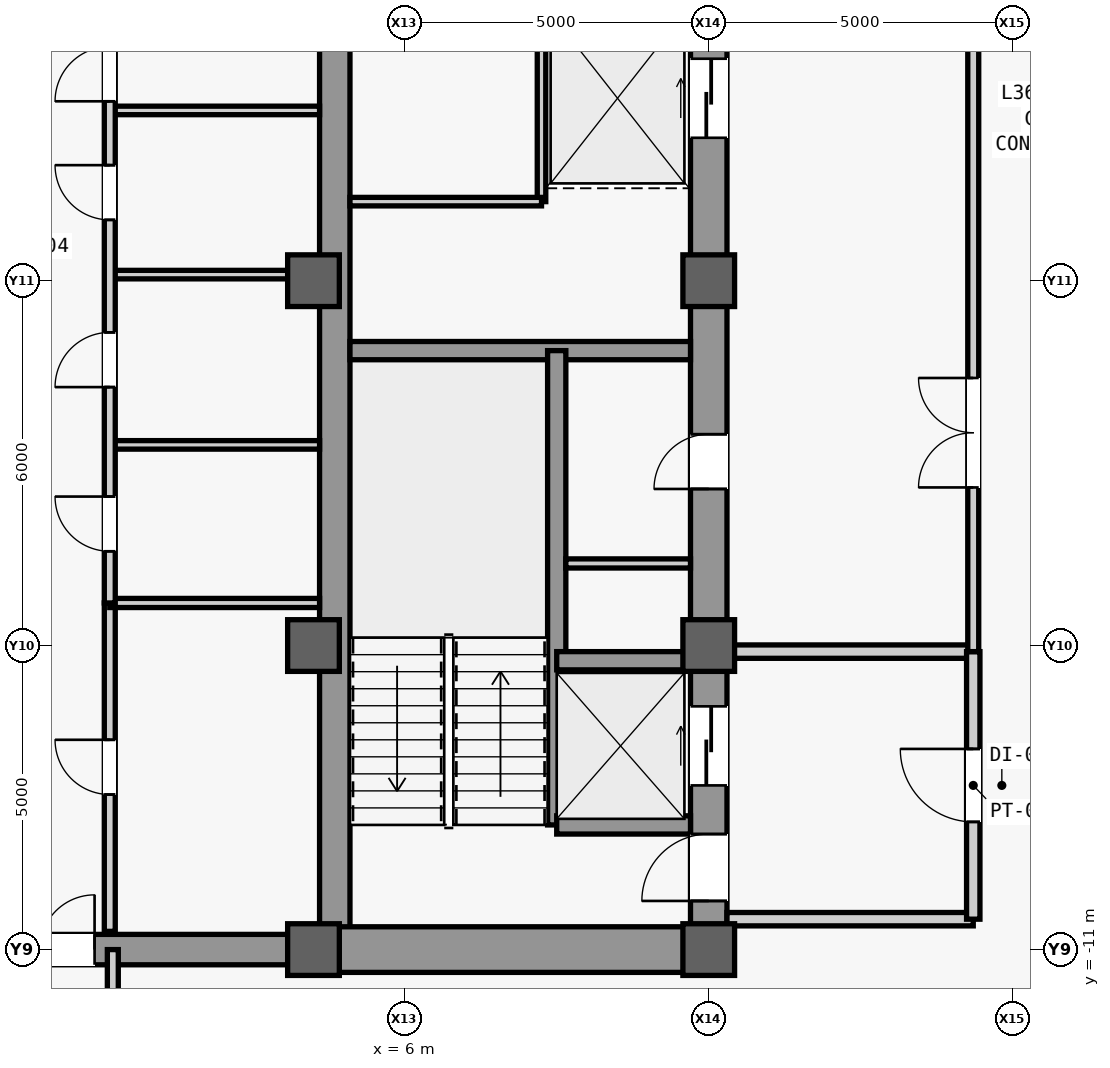
"""IFC4 building model, lengths in metres.
Left out: names, types, materials, properties, quantities, classifications, styles, units other than length and angle.
Written with IfcOpenShell. Run it as: python <this file> out.ifc"""

import sys

from ifc_helpers import new_model, si_unit, direction, frame, frame_2d, origin, origin_2d, place, context, subcontext, project, spatial, rectangle, extrude, source, transform, mapped, element, fill, save


model = new_model("IFC4")
c1 = context("Model", 3, precision=1e-05, world=origin(), true_north=direction((0.0, 1.0)))
c2 = subcontext(c1, "Body", "Model", "MODEL_VIEW")
j1 = project(units=[si_unit("LENGTHUNIT", "METRE"), si_unit("PLANEANGLEUNIT", "RADIAN")], contexts=[c1])
p1 = place(None, origin())
s1 = spatial("IfcSite", under=j1, at=p1, CompositionType="ELEMENT")
p2 = place(p1, origin())
s2 = spatial("IfcBuilding", under=s1, at=p2, CompositionType="ELEMENT")
p3 = place(p2, frame((0.0, 0.0, 159.1)))
s3 = spatial("IfcBuildingStorey", under=s2, at=p3, CompositionType="ELEMENT", Elevation=159.1)
m1 = source(origin(), c2, "Body", "SweptSolid", [
    extrude(rectangle(XDim=22.0, YDim=0.6, at=frame_2d((11.0, 0.0))), origin(), (0.0, 0.0, 1.0), 3.78),
])
p4 = place(p3, frame((11.0, -11.0, 0.0), z_axis=(0.0, 0.0, 1.0), x_axis=(0.0, 1.0, 0.0)))
e1 = element("IfcWall", 1, at=p4, inside=s3, PredefinedType="SHEAR", context=c2, shape_type="MappedRepresentation", body=[
    mapped(m1, transform((0.0, 0.0, 0.0), scale=1.0)),
])
m2 = source(origin(), c2, "Body", "SweptSolid", [
    extrude(rectangle(XDim=1.1, YDim=2.2, at=frame_2d((0.55, 1.1))), frame((0.0, 0.31, 0.0), z_axis=(0.0, -1.0, 0.0), x_axis=(1.0, 0.0, 0.0)), (0.0, 0.0, 1.0), 0.62),
])
p5 = place(p4, frame((0.8, 0.0, 0.0)))
e2 = element("IfcOpeningElement", 2, at=p5, cuts=e1, PredefinedType="OPENING", context=c2, shape_type="MappedRepresentation", body=[
    mapped(m2, transform((0.0, 0.0, 0.0), scale=1.0)),
])
m3 = source(origin(), c2, "Body", "SweptSolid", [
    extrude(rectangle(XDim=0.9, YDim=2.15, at=frame_2d((0.45, 1.075))), frame((0.0, 0.31, 0.0), z_axis=(0.0, -1.0, 0.0), x_axis=(1.0, 0.0, 0.0)), (0.0, 0.0, 1.0), 0.62),
])
p6 = place(p4, frame((7.575, 0.0, 0.0)))
e3 = element("IfcOpeningElement", 3, at=p6, cuts=e1, PredefinedType="OPENING", context=c2, shape_type="MappedRepresentation", body=[
    mapped(m3, transform((0.0, 0.0, 0.0), scale=1.0)),
])
m4 = source(origin(), c2, "Body", "SweptSolid", [
    extrude(rectangle(XDim=1.3, YDim=2.3, at=frame_2d((0.65, 1.15))), frame((0.0, 0.31, 0.0), z_axis=(0.0, -1.0, 0.0), x_axis=(1.0, 0.0, 0.0)), (0.0, 0.0, 1.0), 0.62),
])
p7 = place(p4, frame((2.7, 0.0, 0.0)))
e4 = element("IfcOpeningElement", 4, at=p7, cuts=e1, PredefinedType="OPENING", context=c2, shape_type="MappedRepresentation", body=[
    mapped(m4, transform((0.0, 0.0, 0.0), scale=1.0)),
])
p8 = place(p4, frame((13.35, 0.0, 0.0)))
e5 = element("IfcOpeningElement", 5, at=p8, cuts=e1, PredefinedType="OPENING", context=c2, shape_type="MappedRepresentation", body=[
    mapped(m4, transform((0.0, 0.0, 0.0), scale=1.0)),
])
m5 = source(origin(), c2, "Body", "SweptSolid", [
    extrude(rectangle(XDim=21.4, YDim=0.5, at=frame_2d((10.7, 0.0))), origin(), (0.0, 0.0, 1.0), 3.78),
])
p9 = place(p3, frame((4.85, -10.7, 0.0), z_axis=(0.0, 0.0, 1.0), x_axis=(0.0, 1.0, 0.0)))
e6 = element("IfcWall", 6, at=p9, inside=s3, PredefinedType="SHEAR", context=c2, shape_type="MappedRepresentation", body=[
    mapped(m5, transform((0.0, 0.0, 0.0), scale=1.0)),
])
m6 = source(origin(), c2, "Body", "SweptSolid", [
    extrude(rectangle(XDim=5.85, YDim=0.75, at=frame_2d((2.925, 0.0))), origin(), (0.0, 0.0, 1.0), 3.78),
])
p10 = place(p3, frame((4.85, -11.0, 0.0), z_axis=(0.0, 0.0, 1.0), x_axis=(1.0, 0.0, 0.0)))
e7 = element("IfcWall", 7, at=p10, inside=s3, PredefinedType="SHEAR", context=c2, shape_type="MappedRepresentation", body=[
    mapped(m6, transform((0.0, 0.0, 0.0), scale=1.0)),
])
m7 = source(origin(), c2, "Body", "SweptSolid", [
    extrude(rectangle(XDim=5.6, YDim=0.3, at=frame_2d((2.8, 0.0))), origin(), (0.0, 0.0, 1.0), 3.78),
])
p11 = place(p3, frame((5.1, -1.15, 0.0), z_axis=(0.0, 0.0, 1.0), x_axis=(1.0, 0.0, 0.0)))
e8 = element("IfcWall", 8, at=p11, inside=s3, PredefinedType="SHEAR", context=c2, shape_type="MappedRepresentation", body=[
    mapped(m7, transform((0.0, 0.0, 0.0), scale=1.0)),
])
m8 = source(origin(), c2, "Body", "SweptSolid", [
    extrude(rectangle(XDim=9.2, YDim=0.5, at=frame_2d((4.6, 0.0))), origin(), (0.0, 0.0, 1.0), 3.78),
])
p12 = place(p3, frame((-4.6, -11.0, 0.0), z_axis=(0.0, 0.0, 1.0), x_axis=(1.0, 0.0, 0.0)))
e9 = element("IfcWall", 9, at=p12, inside=s3, PredefinedType="SHEAR", context=c2, shape_type="MappedRepresentation", body=[
    mapped(m8, transform((0.0, 0.0, 0.0), scale=1.0)),
])
m9 = source(origin(), c2, "Body", "SweptSolid", [
    extrude(rectangle(XDim=1.8, YDim=2.25, at=frame_2d((0.9, 1.125))), frame((0.0, 0.26, 0.0), z_axis=(0.0, -1.0, 0.0), x_axis=(1.0, 0.0, 0.0)), (0.0, 0.0, 1.0), 0.52),
])
p13 = place(p12, frame((3.7, 0.0, 0.0)))
e10 = element("IfcOpeningElement", 10, at=p13, cuts=e9, PredefinedType="OPENING", context=c2, shape_type="MappedRepresentation", body=[
    mapped(m9, transform((0.0, 0.0, 0.0), scale=1.0)),
])
m10 = source(origin(), c2, "Body", "SweptSolid", [
    extrude(rectangle(XDim=0.85, YDim=0.85, at=origin_2d()), origin(), (0.0, 0.0, 1.0), 4.0),
])
for number, where, z_axis, x_axis in (
    (11, (4.5, -11.0, 0.0), (0.0, 0.0, 1.0), (1.0, 0.0, 0.0)),
    (12, (4.5, -6.0, 0.0), (0.0, 0.0, 1.0), (1.0, 0.0, 0.0)),
    (13, (4.5, 0.0, 0.0), (0.0, 0.0, 1.0), (1.0, 0.0, 0.0)),
    (14, (11.0, -11.0, 0.0), (0.0, 0.0, 1.0), (1.0, 0.0, 0.0)),
    (15, (11.0, -6.0, 0.0), (0.0, 0.0, 1.0), (1.0, 0.0, 0.0)),
    (16, (11.0, 0.0, 0.0), (0.0, 0.0, 1.0), (1.0, 0.0, 0.0)),
):
    element("IfcColumn", number, at=place(p3, frame(where, z_axis=z_axis, x_axis=x_axis)), inside=s3, PredefinedType="COLUMN", context=c2, shape_type="MappedRepresentation", body=[
        mapped(m10, transform((0.0, 0.0, 0.0), scale=1.0)),
    ])
m11 = source(origin(), c2, "Body", "SweptSolid", [
    extrude(rectangle(XDim=7.8, YDim=0.3, at=frame_2d((3.9, 0.0))), origin(), (0.0, 0.0, 1.0), 3.78),
])
p14 = place(p3, frame((8.5, -8.95, 0.0), z_axis=(0.0, 0.0, 1.0), x_axis=(0.0, 1.0, 0.0)))
e17 = element("IfcWall", 17, at=p14, inside=s3, PredefinedType="SHEAR", context=c2, shape_type="MappedRepresentation", body=[
    mapped(m11, transform((0.0, 0.0, 0.0), scale=1.0)),
])
m12 = source(origin(), c2, "Body", "SweptSolid", [
    extrude(rectangle(XDim=2.2, YDim=0.3, at=frame_2d((1.1, 0.0))), origin(), (0.0, 0.0, 1.0), 3.78),
])
for number, where, z_axis, x_axis in (
    (18, (8.5, -8.95, 0.0), (0.0, 0.0, 1.0), (1.0, 0.0, 0.0)),
    (19, (8.5, -6.25, 0.0), (0.0, 0.0, 1.0), (1.0, 0.0, 0.0)),
):
    element("IfcWall", number, at=place(p3, frame(where, z_axis=z_axis, x_axis=x_axis)), inside=s3, PredefinedType="SHEAR", context=c2, shape_type="MappedRepresentation", body=[
        mapped(m12, transform((0.0, 0.0, 0.0), scale=1.0)),
    ])
m13 = source(origin(), c2, "Body", "SweptSolid", [
    extrude(rectangle(XDim=2.05, YDim=0.15, at=frame_2d((1.025, 0.0))), origin(), (0.0, 0.0, 1.0), 3.78),
])
p15 = place(p3, frame((8.65, -4.65, 0.0), z_axis=(0.0, 0.0, 1.0), x_axis=(1.0, 0.0, 0.0)))
e20 = element("IfcWall", 20, at=p15, inside=s3, PredefinedType="PARTITIONING", context=c2, shape_type="MappedRepresentation", body=[
    mapped(m13, transform((0.0, 0.0, 0.0), scale=1.0)),
])
m14 = source(origin(), c2, "Body", "SweptSolid", [
    extrude(rectangle(XDim=9.4, YDim=0.14, at=frame_2d((4.7, 0.0))), origin(), (0.0, 0.0, 1.0), 3.78),
])
p16 = place(p3, frame((8.25, 1.3, 0.0), z_axis=(0.0, 0.0, 1.0), x_axis=(0.0, 1.0, 0.0)))
e21 = element("IfcWall", 21, at=p16, inside=s3, PredefinedType="PARTITIONING", context=c2, shape_type="MappedRepresentation", body=[
    mapped(m14, transform((0.0, 0.0, 0.0), scale=1.0)),
])
m15 = source(origin(), c2, "Body", "SweptSolid", [
    extrude(rectangle(XDim=3.15, YDim=0.14, at=frame_2d((1.575, 0.0))), origin(), (0.0, 0.0, 1.0), 3.78),
])
p17 = place(p3, frame((5.1, 1.3, 0.0), z_axis=(0.0, 0.0, 1.0), x_axis=(1.0, 0.0, 0.0)))
e22 = element("IfcWall", 22, at=p17, inside=s3, PredefinedType="PARTITIONING", context=c2, shape_type="MappedRepresentation", body=[
    mapped(m15, transform((0.0, 0.0, 0.0), scale=1.0)),
])
m16 = source(origin(), c2, "Body", "SweptSolid", [
    extrude(rectangle(XDim=4.05, YDim=0.22, at=frame_2d((2.025, 0.0))), origin(), (0.0, 0.0, 1.0), 3.78),
])
p18 = place(p3, frame((11.3, -10.5, 0.0), z_axis=(0.0, 0.0, 1.0), x_axis=(1.0, 0.0, 0.0)))
e23 = element("IfcWall", 23, at=p18, inside=s3, PredefinedType="PARTITIONING", context=c2, shape_type="MappedRepresentation", body=[
    mapped(m16, transform((0.0, 0.0, 0.0), scale=1.0)),
])
m17 = source(origin(), c2, "Body", "SweptSolid", [
    extrude(rectangle(XDim=4.05, YDim=0.22, at=frame_2d((2.025, 0.0))), origin(), (0.0, 0.0, 1.0), 3.007),
])
p19 = place(p3, frame((11.3, -6.1, 0.0), z_axis=(0.0, 0.0, 1.0), x_axis=(1.0, 0.0, 0.0)))
e24 = element("IfcWall", 24, at=p19, inside=s3, PredefinedType="PARTITIONING", context=c2, shape_type="MappedRepresentation", body=[
    mapped(m17, transform((0.0, 0.0, 0.0), scale=1.0)),
])
m18 = source(origin(), c2, "Body", "SweptSolid", [
    extrude(rectangle(XDim=4.4, YDim=0.22, at=frame_2d((2.2, 0.0))), origin(), (0.0, 0.0, 1.0), 3.78),
])
p20 = place(p3, frame((15.35, -10.5, 0.0), z_axis=(0.0, 0.0, 1.0), x_axis=(0.0, 1.0, 0.0)))
e25 = element("IfcWall", 25, at=p20, inside=s3, PredefinedType="PARTITIONING", context=c2, shape_type="MappedRepresentation", body=[
    mapped(m18, transform((0.0, 0.0, 0.0), scale=1.0)),
])
m19 = source(origin(), c2, "Body", "SweptSolid", [
    extrude(rectangle(XDim=1.2, YDim=2.2, at=frame_2d((0.6, 1.1))), frame((0.0, 0.12, 0.0), z_axis=(0.0, -1.0, 0.0), x_axis=(1.0, 0.0, 0.0)), (0.0, 0.0, 1.0), 0.24),
])
p21 = place(p20, frame((1.6, 0.0, 0.0)))
e26 = element("IfcOpeningElement", 26, at=p21, cuts=e25, PredefinedType="OPENING", context=c2, shape_type="MappedRepresentation", body=[
    mapped(m19, transform((0.0, 0.0, 0.0), scale=1.0)),
])
m20 = source(origin(), c2, "Body", "SweptSolid", [
    extrude(rectangle(XDim=16.6, YDim=0.18, at=frame_2d((8.3, 0.0))), origin(), (0.0, 0.0, 1.0), 3.78),
])
p22 = place(p3, frame((15.35, -6.1, 0.0), z_axis=(0.0, 0.0, 1.0), x_axis=(0.0, 1.0, 0.0)))
e27 = element("IfcWall", 27, at=p22, inside=s3, PredefinedType="PARTITIONING", context=c2, shape_type="MappedRepresentation", body=[
    mapped(m20, transform((0.0, 0.0, 0.0), scale=1.0)),
])
m21 = source(origin(), c2, "Body", "SweptSolid", [
    extrude(rectangle(XDim=1.8, YDim=2.25, at=frame_2d((0.9, 1.125))), frame((0.0, 0.1, 0.0), z_axis=(0.0, -1.0, 0.0), x_axis=(1.0, 0.0, 0.0)), (0.0, 0.0, 1.0), 0.2),
])
p23 = place(p22, frame((2.7, 0.0, 0.0)))
e28 = element("IfcOpeningElement", 28, at=p23, cuts=e27, PredefinedType="OPENING", context=c2, shape_type="MappedRepresentation", body=[
    mapped(m21, transform((0.0, 0.0, 0.0), scale=1.0)),
])
p24 = place(p22, frame((13.0, 0.0, 0.0)))
e29 = element("IfcOpeningElement", 29, at=p24, cuts=e27, PredefinedType="OPENING", context=c2, shape_type="MappedRepresentation", body=[
    mapped(m21, transform((0.0, 0.0, 0.0), scale=1.0)),
])
m22 = source(origin(), c2, "Body", "SweptSolid", [
    extrude(rectangle(XDim=5.4, YDim=0.18, at=frame_2d((2.7, 0.0))), origin(), (0.0, 0.0, 1.0), 3.78),
])
p25 = place(p3, frame((1.15, -10.7, 0.0), z_axis=(0.0, 0.0, 1.0), x_axis=(0.0, 1.0, 0.0)))
e30 = element("IfcWall", 30, at=p25, inside=s3, PredefinedType="PARTITIONING", context=c2, shape_type="MappedRepresentation", body=[
    mapped(m22, transform((0.0, 0.0, 0.0), scale=1.0)),
])
m23 = source(origin(), c2, "Body", "SweptSolid", [
    extrude(rectangle(XDim=0.9, YDim=2.15, at=frame_2d((0.45, 1.075))), frame((0.0, 0.1, 0.0), z_axis=(0.0, -1.0, 0.0), x_axis=(1.0, 0.0, 0.0)), (0.0, 0.0, 1.0), 0.2),
])
p26 = place(p25, frame((2.25, 0.0, 0.0)))
e31 = element("IfcOpeningElement", 31, at=p26, cuts=e30, PredefinedType="OPENING", context=c2, shape_type="MappedRepresentation", body=[
    mapped(m23, transform((0.0, 0.0, 0.0), scale=1.0)),
])
m24 = source(origin(), c2, "Body", "SweptSolid", [
    extrude(rectangle(XDim=3.45, YDim=0.15, at=frame_2d((1.725, 0.0))), origin(), (0.0, 0.0, 1.0), 3.78),
])
p27 = place(p3, frame((1.15, -5.3, 0.0), z_axis=(0.0, 0.0, 1.0), x_axis=(1.0, 0.0, 0.0)))
e32 = element("IfcWall", 32, at=p27, inside=s3, PredefinedType="PARTITIONING", context=c2, shape_type="MappedRepresentation", body=[
    mapped(m24, transform((0.0, 0.0, 0.0), scale=1.0)),
])
m25 = source(origin(), c2, "Body", "SweptSolid", [
    extrude(rectangle(XDim=3.45, YDim=0.14, at=frame_2d((1.725, 0.0))), origin(), (0.0, 0.0, 1.0), 3.78),
])
p28 = place(p3, frame((1.15, -2.7, 0.0), z_axis=(0.0, 0.0, 1.0), x_axis=(1.0, 0.0, 0.0)))
e33 = element("IfcWall", 33, at=p28, inside=s3, PredefinedType="PARTITIONING", context=c2, shape_type="MappedRepresentation", body=[
    mapped(m25, transform((0.0, 0.0, 0.0), scale=1.0)),
])
m26 = source(origin(), c2, "Body", "SweptSolid", [
    extrude(rectangle(XDim=3.45, YDim=0.14, at=frame_2d((1.725, 0.0))), origin(), (0.0, 0.0, 1.0), 3.085),
])
p29 = place(p3, frame((1.15, 0.1, 0.0), z_axis=(0.0, 0.0, 1.0), x_axis=(1.0, 0.0, 0.0)))
e34 = element("IfcWall", 34, at=p29, inside=s3, PredefinedType="PARTITIONING", context=c2, shape_type="MappedRepresentation", body=[
    mapped(m26, transform((0.0, 0.0, 0.0), scale=1.0)),
])
p30 = place(p3, frame((1.15, 2.8, 0.0), z_axis=(0.0, 0.0, 1.0), x_axis=(1.0, 0.0, 0.0)))
e35 = element("IfcWall", 35, at=p30, inside=s3, PredefinedType="PARTITIONING", context=c2, shape_type="MappedRepresentation", body=[
    mapped(m25, transform((0.0, 0.0, 0.0), scale=1.0)),
])
m27 = source(origin(), c2, "Body", "SweptSolid", [
    extrude(rectangle(XDim=10.6, YDim=0.18, at=frame_2d((5.3, 0.0))), origin(), (0.0, 0.0, 1.0), 3.78),
])
p31 = place(p3, frame((1.15, -5.3, 0.0), z_axis=(0.0, 0.0, 1.0), x_axis=(0.0, 1.0, 0.0)))
e36 = element("IfcWall", 36, at=p31, inside=s3, PredefinedType="PARTITIONING", context=c2, shape_type="MappedRepresentation", body=[
    mapped(m27, transform((0.0, 0.0, 0.0), scale=1.0)),
])
p32 = place(p31, frame((0.85, 0.0, 0.0)))
e37 = element("IfcOpeningElement", 37, at=p32, cuts=e36, PredefinedType="OPENING", context=c2, shape_type="MappedRepresentation", body=[
    mapped(m23, transform((0.0, 0.0, 0.0), scale=1.0)),
])
p33 = place(p31, frame((3.55, 0.0, 0.0)))
e38 = element("IfcOpeningElement", 38, at=p33, cuts=e36, PredefinedType="OPENING", context=c2, shape_type="MappedRepresentation", body=[
    mapped(m23, transform((0.0, 0.0, 0.0), scale=1.0)),
])
p34 = place(p31, frame((6.3, 0.0, 0.0)))
e39 = element("IfcOpeningElement", 39, at=p34, cuts=e36, PredefinedType="OPENING", context=c2, shape_type="MappedRepresentation", body=[
    mapped(m23, transform((0.0, 0.0, 0.0), scale=1.0)),
])
p35 = place(p31, frame((8.25, 0.0, 0.0)))
e40 = element("IfcOpeningElement", 40, at=p35, cuts=e36, PredefinedType="OPENING", context=c2, shape_type="MappedRepresentation", body=[
    mapped(m23, transform((0.0, 0.0, 0.0), scale=1.0)),
])
p36 = place(p31, frame((9.475, 0.0, 0.0)))
e41 = element("IfcOpeningElement", 41, at=p36, cuts=e36, PredefinedType="OPENING", context=c2, shape_type="MappedRepresentation", body=[
    mapped(m23, transform((0.0, 0.0, 0.0), scale=1.0)),
])
m28 = source(origin(), c2, "Body", "SweptSolid", [
    extrude(rectangle(XDim=2.6, YDim=0.18, at=frame_2d((1.3, 0.0))), origin(), (0.0, 0.0, 1.0), 3.78),
])
p37 = place(p3, frame((1.2, -13.6, 0.0), z_axis=(0.0, 0.0, 1.0), x_axis=(0.0, 1.0, 0.0)))
e42 = element("IfcWall", 42, at=p37, inside=s3, PredefinedType="PARTITIONING", context=c2, shape_type="MappedRepresentation", body=[
    mapped(m28, transform((0.0, 0.0, 0.0), scale=1.0)),
])
m29 = source(origin(), c2, "Body", "SweptSolid", [
    extrude(rectangle(XDim=1.1, YDim=2.2, at=frame_2d((0.55, 1.1))), frame((0.0, 0.025, 0.0), z_axis=(0.0, -1.0, 0.0), x_axis=(1.0, 0.0, 0.0)), (0.0, 0.0, 1.0), 0.05),
])
p38 = place(p5, origin())
e43 = element("IfcDoor", 43, at=p38, inside=s3, OperationType="SINGLE_SWING_LEFT", PredefinedType="DOOR", context=c2, shape_type="MappedRepresentation", body=[
    mapped(m29, transform((0.0, 0.0, 0.0), scale=1.0)),
])
fill(e2, e43)
m30 = source(origin(), c2, "Body", "SweptSolid", [
    extrude(rectangle(XDim=0.9, YDim=2.15, at=frame_2d((0.45, 1.075))), frame((0.0, 0.025, 0.0), z_axis=(0.0, -1.0, 0.0), x_axis=(1.0, 0.0, 0.0)), (0.0, 0.0, 1.0), 0.05),
])
p39 = place(p6, origin())
e44 = element("IfcDoor", 44, at=p39, inside=s3, OperationType="SINGLE_SWING_LEFT", PredefinedType="DOOR", context=c2, shape_type="MappedRepresentation", body=[
    mapped(m30, transform((0.0, 0.0, 0.0), scale=1.0)),
])
fill(e3, e44)
m31 = source(origin(), c2, "Body", "SweptSolid", [
    extrude(rectangle(XDim=1.2, YDim=2.2, at=frame_2d((0.6, 1.1))), frame((0.0, 0.025, 0.0), z_axis=(0.0, -1.0, 0.0), x_axis=(1.0, 0.0, 0.0)), (0.0, 0.0, 1.0), 0.05),
])
p40 = place(p21, origin())
e45 = element("IfcDoor", 45, at=p40, inside=s3, OperationType="SINGLE_SWING_RIGHT", PredefinedType="DOOR", context=c2, shape_type="MappedRepresentation", body=[
    mapped(m31, transform((0.0, 0.0, 0.0), scale=1.0)),
])
fill(e26, e45)
m32 = source(origin(), c2, "Body", "SweptSolid", [
    extrude(rectangle(XDim=1.8, YDim=2.25, at=frame_2d((0.9, 1.125))), frame((0.0, 0.025, 0.0), z_axis=(0.0, -1.0, 0.0), x_axis=(1.0, 0.0, 0.0)), (0.0, 0.0, 1.0), 0.05),
])
p41 = place(p23, origin())
e46 = element("IfcDoor", 46, at=p41, inside=s3, OperationType="SINGLE_SWING_RIGHT", PredefinedType="DOOR", context=c2, shape_type="MappedRepresentation", body=[
    mapped(m32, transform((0.0, 0.0, 0.0), scale=1.0)),
])
fill(e28, e46)
p42 = place(p26, origin())
e47 = element("IfcDoor", 47, at=p42, inside=s3, OperationType="SINGLE_SWING_RIGHT", PredefinedType="DOOR", context=c2, shape_type="MappedRepresentation", body=[
    mapped(m30, transform((0.0, 0.0, 0.0), scale=1.0)),
])
fill(e31, e47)
p43 = place(p13, origin())
e48 = element("IfcDoor", 48, at=p43, inside=s3, OperationType="SINGLE_SWING_LEFT", PredefinedType="DOOR", context=c2, shape_type="MappedRepresentation", body=[
    mapped(m32, transform((0.0, 0.0, 0.0), scale=1.0)),
])
fill(e10, e48)
p44 = place(p32, origin())
e49 = element("IfcDoor", 49, at=p44, inside=s3, OperationType="SINGLE_SWING_RIGHT", PredefinedType="DOOR", context=c2, shape_type="MappedRepresentation", body=[
    mapped(m30, transform((0.0, 0.0, 0.0), scale=1.0)),
])
fill(e37, e49)
p45 = place(p33, origin())
e50 = element("IfcDoor", 50, at=p45, inside=s3, OperationType="SINGLE_SWING_LEFT", PredefinedType="DOOR", context=c2, shape_type="MappedRepresentation", body=[
    mapped(m30, transform((0.0, 0.0, 0.0), scale=1.0)),
])
fill(e38, e50)
p46 = place(p34, origin())
e51 = element("IfcDoor", 51, at=p46, inside=s3, OperationType="SINGLE_SWING_RIGHT", PredefinedType="DOOR", context=c2, shape_type="MappedRepresentation", body=[
    mapped(m30, transform((0.0, 0.0, 0.0), scale=1.0)),
])
fill(e39, e51)
p47 = place(p35, origin())
e52 = element("IfcDoor", 52, at=p47, inside=s3, OperationType="SINGLE_SWING_LEFT", PredefinedType="DOOR", context=c2, shape_type="MappedRepresentation", body=[
    mapped(m30, transform((0.0, 0.0, 0.0), scale=1.0)),
])
fill(e40, e52)
m33 = source(origin(), c2, "Body", "SweptSolid", [
    extrude(rectangle(XDim=1.3, YDim=2.3, at=frame_2d((0.65, 1.15))), frame((0.0, 0.025, 0.0), z_axis=(0.0, -1.0, 0.0), x_axis=(1.0, 0.0, 0.0)), (0.0, 0.0, 1.0), 0.05),
])
p48 = place(p7, origin())
e53 = element("IfcDoor", 53, at=p48, inside=s3, OperationType="SLIDING_TO_LEFT", PredefinedType="DOOR", context=c2, shape_type="MappedRepresentation", body=[
    mapped(m33, transform((0.0, 0.0, 0.0), scale=1.0)),
])
fill(e4, e53)
p49 = place(p8, origin())
e54 = element("IfcDoor", 54, at=p49, inside=s3, OperationType="SLIDING_TO_LEFT", PredefinedType="DOOR", context=c2, shape_type="MappedRepresentation", body=[
    mapped(m33, transform((0.0, 0.0, 0.0), scale=1.0)),
])
fill(e5, e54)
save(model, sys.argv[1])
